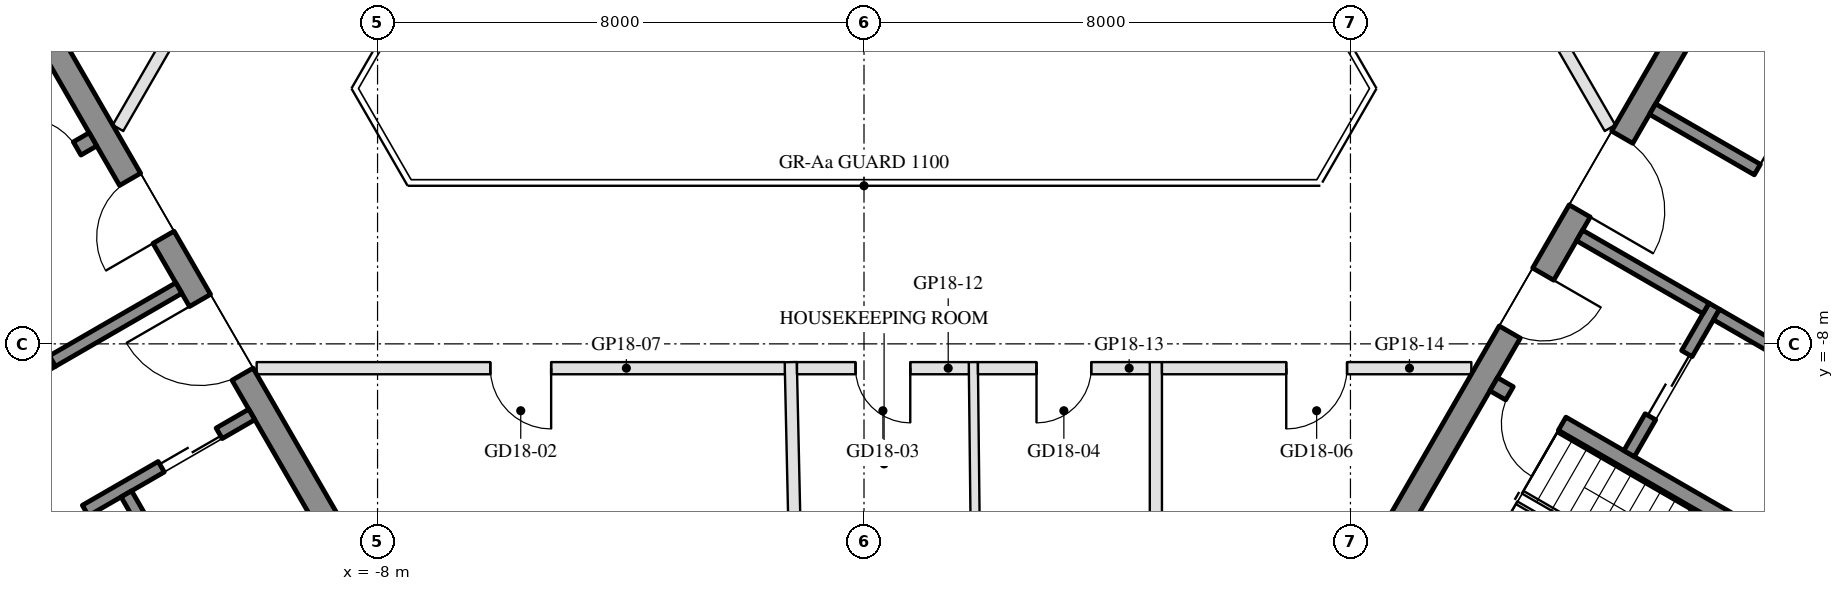
"""IFC4 building model, lengths in metres.
Left out: names, types, materials, properties, quantities, classifications, styles, units other than length and angle.
Written with IfcOpenShell. Run it as: python <this file> out.ifc"""

import sys

from ifc_helpers import new_model, si_unit, direction, frame, frame_2d, origin, place, context, subcontext, project, spatial, rectangle, extrude, element, fill, save


model = new_model("IFC4")
c1 = context("Model", 3, precision=1e-05, world=origin(), true_north=direction((0.0, 1.0)))
c2 = subcontext(c1, "Body", "Model", "MODEL_VIEW")
j1 = project(units=[si_unit("LENGTHUNIT", "METRE"), si_unit("PLANEANGLEUNIT", "RADIAN")], contexts=[c1])
p1 = place(None, origin())
s1 = spatial("IfcSite", under=j1, at=p1, CompositionType="ELEMENT")
p2 = place(p1, origin())
s2 = spatial("IfcBuilding", under=s1, at=p2, CompositionType="ELEMENT")
p3 = place(p2, frame((0.0, 0.0, 194.7)))
s3 = spatial("IfcBuildingStorey", under=s2, at=p3, CompositionType="ELEMENT", Elevation=194.7)
p4 = place(p3, frame((-13.845, -2.22, 0.0), z_axis=(0.0, 0.0, 1.0), x_axis=(0.500004234368, -0.866022959057, 0.0)))
e1 = element("IfcWall", 1, at=p4, inside=s3, PredefinedType="SHEAR", context=c2, shape_type="SweptSolid", body=[
    extrude(rectangle(XDim=10.0, YDim=0.4, at=frame_2d((5.0, 0.0))), origin(), (0.0, 0.0, 1.0), 3.5),
])
p5 = place(p4, frame((3.55, 0.0, 0.0)))
e2 = element("IfcOpeningElement", 2, at=p5, cuts=e1, PredefinedType="OPENING", context=c2, shape_type="SweptSolid", body=[
    extrude(rectangle(XDim=1.1, YDim=2.1, at=frame_2d((0.55, 1.05))), frame((0.0, 0.21, 0.0), z_axis=(0.0, -1.0, 0.0), x_axis=(1.0, 0.0, 0.0)), (0.0, 0.0, 1.0), 0.42),
])
p6 = place(p4, frame((5.85, 0.0, 0.0)))
e3 = element("IfcOpeningElement", 3, at=p6, cuts=e1, PredefinedType="OPENING", context=c2, shape_type="SweptSolid", body=[
    extrude(rectangle(XDim=1.4, YDim=2.1, at=frame_2d((0.7, 1.05))), frame((0.0, 0.21, 0.0), z_axis=(0.0, -1.0, 0.0), x_axis=(1.0, 0.0, 0.0)), (0.0, 0.0, 1.0), 0.42),
])
p7 = place(p3, frame((-12.681, -4.636, 0.0), z_axis=(0.0, 0.0, 1.0), x_axis=(-0.866021702275, -0.500006411147, 0.0)))
e4 = element("IfcWall", 4, at=p7, inside=s3, PredefinedType="SHEAR", context=c2, shape_type="SweptSolid", body=[
    extrude(rectangle(XDim=6.45, YDim=0.25, at=frame_2d((3.225, 0.0))), origin(), (0.0, 0.0, 1.0), 3.5),
])
p8 = place(p7, frame((0.3, 0.0, 0.0)))
e5 = element("IfcOpeningElement", 5, at=p8, cuts=e4, PredefinedType="OPENING", context=c2, shape_type="SweptSolid", body=[
    extrude(rectangle(XDim=1.0, YDim=2.1, at=frame_2d((0.5, 1.05))), frame((0.0, 0.135, 0.0), z_axis=(0.0, -1.0, 0.0), x_axis=(1.0, 0.0, 0.0)), (0.0, 0.0, 1.0), 0.27),
])
p9 = place(p3, frame((-14.783, -5.995, 0.0), z_axis=(0.0, 0.0, 1.0), x_axis=(0.49994636267, -0.866056369097, 0.0)))
e6 = element("IfcWall", 6, at=p9, inside=s3, PredefinedType="SHEAR", context=c2, shape_type="SweptSolid", body=[
    extrude(rectangle(XDim=2.8, YDim=0.2, at=frame_2d((1.4, 0.0))), origin(), (0.0, 0.0, 1.0), 3.5),
])
p10 = place(p9, frame((0.7, 0.0, 0.0)))
e7 = element("IfcOpeningElement", 7, at=p10, cuts=e6, PredefinedType="OPENING", context=c2, shape_type="SweptSolid", body=[
    extrude(rectangle(XDim=1.2, YDim=2.1, at=frame_2d((0.6, 1.05))), frame((0.0, 0.11, 0.0), z_axis=(0.0, -1.0, 0.0), x_axis=(1.0, 0.0, 0.0)), (0.0, 0.0, 1.0), 0.22),
])
p11 = place(p3, frame((-11.268, -7.083, 0.0), z_axis=(0.0, 0.0, 1.0), x_axis=(-0.866050077142, -0.499957262057, 0.0)))
e8 = element("IfcWall", 8, at=p11, inside=s3, PredefinedType="SHEAR", context=c2, shape_type="SweptSolid", body=[
    extrude(rectangle(XDim=2.4, YDim=0.2, at=frame_2d((1.2, 0.0))), origin(), (0.0, 0.0, 1.0), 3.5),
])
p12 = place(p3, frame((-10.068, -9.162, 0.0), z_axis=(0.0, 0.0, 1.0), x_axis=(-0.866032725843, -0.499987317609, 0.0)))
e9 = element("IfcWall", 9, at=p12, inside=s3, PredefinedType="SHEAR", context=c2, shape_type="SweptSolid", body=[
    extrude(rectangle(XDim=10.16, YDim=0.2, at=frame_2d((5.08, 0.0))), origin(), (0.0, 0.0, 1.0), 3.5),
])
p13 = place(p12, frame((0.62, 0.0, 0.0)))
e10 = element("IfcOpeningElement", 10, at=p13, cuts=e9, PredefinedType="OPENING", context=c2, shape_type="SweptSolid", body=[
    extrude(rectangle(XDim=1.1, YDim=2.1, at=frame_2d((0.55, 1.05))), frame((0.0, 0.11, 0.0), z_axis=(0.0, -1.0, 0.0), x_axis=(1.0, 0.0, 0.0)), (0.0, 0.0, 1.0), 0.22),
])
p14 = place(p12, frame((3.16, 0.0, 0.0)))
e11 = element("IfcOpeningElement", 11, at=p14, cuts=e9, PredefinedType="OPENING", context=c2, shape_type="SweptSolid", body=[
    extrude(rectangle(XDim=1.1, YDim=2.1, at=frame_2d((0.55, 1.05))), frame((0.0, 0.11, 0.0), z_axis=(0.0, -1.0, 0.0), x_axis=(1.0, 0.0, 0.0)), (0.0, 0.0, 1.0), 0.22),
])
p15 = place(p12, frame((5.7, 0.0, 0.0)))
e12 = element("IfcOpeningElement", 12, at=p15, cuts=e9, PredefinedType="OPENING", context=c2, shape_type="SweptSolid", body=[
    extrude(rectangle(XDim=1.1, YDim=2.1, at=frame_2d((0.55, 1.05))), frame((0.0, 0.11, 0.0), z_axis=(0.0, -1.0, 0.0), x_axis=(1.0, 0.0, 0.0)), (0.0, 0.0, 1.0), 0.22),
])
p16 = place(p12, frame((8.24, 0.0, 0.0)))
e13 = element("IfcOpeningElement", 13, at=p16, cuts=e9, PredefinedType="OPENING", context=c2, shape_type="SweptSolid", body=[
    extrude(rectangle(XDim=1.1, YDim=2.1, at=frame_2d((0.55, 1.05))), frame((0.0, 0.11, 0.0), z_axis=(0.0, -1.0, 0.0), x_axis=(1.0, 0.0, 0.0)), (0.0, 0.0, 1.0), 0.22),
])
p17 = place(p3, frame((-12.131, -10.468, 0.0), z_axis=(0.0, 0.0, 1.0), x_axis=(0.499972520799, -0.866041268327, 0.0)))
e14 = element("IfcWall", 14, at=p17, inside=s3, PredefinedType="SHEAR", context=c2, shape_type="SweptSolid", body=[
    extrude(rectangle(XDim=2.0, YDim=0.2, at=frame_2d((1.0, 0.0))), origin(), (0.0, 0.0, 1.0), 3.5),
])
p18 = place(p3, frame((13.797, -1.903, 0.0), z_axis=(0.0, 0.0, 1.0), x_axis=(0.866025009528, -0.500000682871, 0.0)))
e15 = element("IfcWall", 15, at=p18, inside=s3, PredefinedType="SHEAR", context=c2, shape_type="SweptSolid", body=[
    extrude(rectangle(XDim=14.837, YDim=0.5, at=frame_2d((7.418, 0.0))), origin(), (0.0, 0.0, 1.0), 3.5),
])
p19 = place(p3, frame((8.845, -10.88, 0.0), z_axis=(0.0, 0.0, 1.0), x_axis=(0.500004234368, 0.866022959057, 0.0)))
e16 = element("IfcWall", 16, at=p19, inside=s3, PredefinedType="SHEAR", context=c2, shape_type="SweptSolid", body=[
    extrude(rectangle(XDim=10.0, YDim=0.4, at=frame_2d((5.0, 0.0))), origin(), (0.0, 0.0, 1.0), 3.5),
])
p20 = place(p19, frame((3.55, 0.0, 0.0)))
e17 = element("IfcOpeningElement", 17, at=p20, cuts=e16, PredefinedType="OPENING", context=c2, shape_type="SweptSolid", body=[
    extrude(rectangle(XDim=1.1, YDim=2.1, at=frame_2d((0.55, 1.05))), frame((0.0, 0.21, 0.0), z_axis=(0.0, -1.0, 0.0), x_axis=(1.0, 0.0, 0.0)), (0.0, 0.0, 1.0), 0.42),
])
p21 = place(p19, frame((5.85, 0.0, 0.0)))
e18 = element("IfcOpeningElement", 18, at=p21, cuts=e16, PredefinedType="OPENING", context=c2, shape_type="SweptSolid", body=[
    extrude(rectangle(XDim=1.4, YDim=2.1, at=frame_2d((0.7, 1.05))), frame((0.0, 0.21, 0.0), z_axis=(0.0, -1.0, 0.0), x_axis=(1.0, 0.0, 0.0)), (0.0, 0.0, 1.0), 0.42),
])
p22 = place(p3, frame((10.356, -8.664, 0.0), z_axis=(0.0, 0.0, 1.0), x_axis=(0.866028629588, -0.499994412703, 0.0)))
e19 = element("IfcWall", 19, at=p22, inside=s3, PredefinedType="SHEAR", context=c2, shape_type="SweptSolid", body=[
    extrude(rectangle(XDim=6.45, YDim=0.25, at=frame_2d((3.225, 0.0))), origin(), (0.0, 0.0, 1.0), 3.5),
])
p23 = place(p22, frame((0.3, 0.0, 0.0)))
e20 = element("IfcOpeningElement", 20, at=p23, cuts=e19, PredefinedType="OPENING", context=c2, shape_type="SweptSolid", body=[
    extrude(rectangle(XDim=1.0, YDim=2.1, at=frame_2d((0.5, 1.05))), frame((0.0, 0.135, 0.0), z_axis=(0.0, -1.0, 0.0), x_axis=(1.0, 0.0, 0.0)), (0.0, 0.0, 1.0), 0.27),
])
p24 = place(p3, frame((12.583, -9.805, 0.0), z_axis=(0.0, 0.0, 1.0), x_axis=(0.49994636267, 0.866056369097, 0.0)))
e21 = element("IfcWall", 21, at=p24, inside=s3, PredefinedType="SHEAR", context=c2, shape_type="SweptSolid", body=[
    extrude(rectangle(XDim=2.8, YDim=0.2, at=frame_2d((1.4, 0.0))), origin(), (0.0, 0.0, 1.0), 3.5),
])
p25 = place(p24, frame((0.7, 0.0, 0.0)))
e22 = element("IfcOpeningElement", 22, at=p25, cuts=e21, PredefinedType="OPENING", context=c2, shape_type="SweptSolid", body=[
    extrude(rectangle(XDim=1.2, YDim=2.1, at=frame_2d((0.6, 1.05))), frame((0.0, 0.11, 0.0), z_axis=(0.0, -1.0, 0.0), x_axis=(1.0, 0.0, 0.0)), (0.0, 0.0, 1.0), 0.22),
])
p26 = place(p3, frame((11.768, -6.217, 0.0), z_axis=(0.0, 0.0, 1.0), x_axis=(0.866050077142, -0.499957262057, 0.0)))
e23 = element("IfcWall", 23, at=p26, inside=s3, PredefinedType="SHEAR", context=c2, shape_type="SweptSolid", body=[
    extrude(rectangle(XDim=2.4, YDim=0.2, at=frame_2d((1.2, 0.0))), origin(), (0.0, 0.0, 1.0), 3.5),
])
p27 = place(p3, frame((14.02, -7.517, 0.0), z_axis=(0.0, 0.0, 1.0), x_axis=(0.866034573852, -0.49998411664, 0.0)))
e24 = element("IfcWall", 24, at=p27, inside=s3, PredefinedType="SHEAR", context=c2, shape_type="SweptSolid", body=[
    extrude(rectangle(XDim=2.8, YDim=0.2, at=frame_2d((1.4, 0.0))), origin(), (0.0, 0.0, 1.0), 3.5),
])
p28 = place(p3, frame((12.968, -4.138, 0.0), z_axis=(0.0, 0.0, 1.0), x_axis=(0.866028328073, -0.49999493495, 0.0)))
e25 = element("IfcWall", 25, at=p28, inside=s3, PredefinedType="SHEAR", context=c2, shape_type="SweptSolid", body=[
    extrude(rectangle(XDim=10.16, YDim=0.2, at=frame_2d((5.08, 0.0))), origin(), (0.0, 0.0, 1.0), 3.5),
])
p29 = place(p28, frame((1.99, 0.0, 0.0)))
e26 = element("IfcOpeningElement", 26, at=p29, cuts=e25, PredefinedType="OPENING", context=c2, shape_type="SweptSolid", body=[
    extrude(rectangle(XDim=0.9, YDim=2.1, at=frame_2d((0.45, 1.05))), frame((0.0, 0.11, 0.0), z_axis=(0.0, -1.0, 0.0), x_axis=(1.0, 0.0, 0.0)), (0.0, 0.0, 1.0), 0.22),
])
p30 = place(p28, frame((7.07, 0.0, 0.0)))
e27 = element("IfcOpeningElement", 27, at=p30, cuts=e25, PredefinedType="OPENING", context=c2, shape_type="SweptSolid", body=[
    extrude(rectangle(XDim=0.9, YDim=2.1, at=frame_2d((0.45, 1.05))), frame((0.0, 0.11, 0.0), z_axis=(0.0, -1.0, 0.0), x_axis=(1.0, 0.0, 0.0)), (0.0, 0.0, 1.0), 0.22),
])
p31 = place(p3, frame((-0.98, -18.38, 0.0), z_axis=(0.0, 0.0, 1.0), x_axis=(-0.022277513004, 0.999751825412, 0.0)))
e28 = element("IfcWall", 28, at=p31, inside=s3, PredefinedType="PARTITIONING", context=c2, shape_type="SweptSolid", body=[
    extrude(rectangle(XDim=10.082, YDim=0.2, at=frame_2d((5.041, 0.0))), origin(), (0.0, 0.0, 1.0), 3.06),
])
p32 = place(p3, frame((4.8, -19.28, 0.0), z_axis=(0.0, 0.0, 1.0), x_axis=(0.0, 1.0, 0.0)))
e29 = element("IfcWall", 29, at=p32, inside=s3, PredefinedType="PARTITIONING", context=c2, shape_type="SweptSolid", body=[
    extrude(rectangle(XDim=10.98, YDim=0.2, at=frame_2d((5.49, 0.0))), origin(), (0.0, 0.0, 1.0), 3.06),
])
p33 = place(p3, frame((-1.302, -8.4, 0.0), z_axis=(0.0, 0.0, 1.0), x_axis=(-1.0, 0.0, 0.0)))
e30 = element("IfcWall", 30, at=p33, inside=s3, PredefinedType="PARTITIONING", context=c2, shape_type="SweptSolid", body=[
    extrude(rectangle(XDim=8.686, YDim=0.2, at=frame_2d((4.343, 0.0))), origin(), (0.0, 0.0, 1.0), 2.95),
])
p34 = place(p33, frame((3.843, 0.0, 0.0)))
e31 = element("IfcOpeningElement", 31, at=p34, cuts=e30, PredefinedType="OPENING", context=c2, shape_type="SweptSolid", body=[
    extrude(rectangle(XDim=1.0, YDim=2.1, at=frame_2d((0.5, 1.05))), frame((0.0, 0.11, 0.0), z_axis=(0.0, -1.0, 0.0), x_axis=(1.0, 0.0, 0.0)), (0.0, 0.0, 1.0), 0.22),
])
p35 = place(p3, frame((1.92, -19.28, 0.0), z_axis=(0.0, 0.0, 1.0), x_axis=(-0.011116847578, 0.999938205941, 0.0)))
e32 = element("IfcWall", 32, at=p35, inside=s3, PredefinedType="PARTITIONING", context=c2, shape_type="SweptSolid", body=[
    extrude(rectangle(XDim=10.981, YDim=0.15, at=frame_2d((5.49, 0.0))), origin(), (0.0, 0.0, 1.0), 3.06),
])
p36 = place(p3, frame((1.724, -8.4, 0.0), z_axis=(0.0, 0.0, 1.0), x_axis=(-1.0, 0.0, 0.0)))
e33 = element("IfcWall", 33, at=p36, inside=s3, PredefinedType="PARTITIONING", context=c2, shape_type="SweptSolid", body=[
    extrude(rectangle(XDim=2.826, YDim=0.2, at=frame_2d((1.413, 0.0))), origin(), (0.0, 0.0, 1.0), 2.95),
])
p37 = place(p36, frame((0.963, 0.0, 0.0)))
e34 = element("IfcOpeningElement", 34, at=p37, cuts=e33, PredefinedType="OPENING", context=c2, shape_type="SweptSolid", body=[
    extrude(rectangle(XDim=0.9, YDim=2.1, at=frame_2d((0.45, 1.05))), frame((0.0, 0.11, 0.0), z_axis=(0.0, -1.0, 0.0), x_axis=(1.0, 0.0, 0.0)), (0.0, 0.0, 1.0), 0.22),
])
p38 = place(p3, frame((4.7, -8.4, 0.0), z_axis=(0.0, 0.0, 1.0), x_axis=(-1.0, 0.0, 0.0)))
e35 = element("IfcWall", 35, at=p38, inside=s3, PredefinedType="PARTITIONING", context=c2, shape_type="SweptSolid", body=[
    extrude(rectangle(XDim=2.826, YDim=0.2, at=frame_2d((1.413, 0.0))), origin(), (0.0, 0.0, 1.0), 2.95),
])
p39 = place(p38, frame((0.963, 0.0, 0.0)))
e36 = element("IfcOpeningElement", 36, at=p39, cuts=e35, PredefinedType="OPENING", context=c2, shape_type="SweptSolid", body=[
    extrude(rectangle(XDim=0.9, YDim=2.1, at=frame_2d((0.45, 1.05))), frame((0.0, 0.11, 0.0), z_axis=(0.0, -1.0, 0.0), x_axis=(1.0, 0.0, 0.0)), (0.0, 0.0, 1.0), 0.22),
])
p40 = place(p3, frame((9.988, -8.4, 0.0), z_axis=(0.0, 0.0, 1.0), x_axis=(-1.0, 0.0, 0.0)))
e37 = element("IfcWall", 37, at=p40, inside=s3, PredefinedType="PARTITIONING", context=c2, shape_type="SweptSolid", body=[
    extrude(rectangle(XDim=5.088, YDim=0.2, at=frame_2d((2.544, 0.0))), origin(), (0.0, 0.0, 1.0), 2.95),
])
p41 = place(p40, frame((2.044, 0.0, 0.0)))
e38 = element("IfcOpeningElement", 38, at=p41, cuts=e37, PredefinedType="OPENING", context=c2, shape_type="SweptSolid", body=[
    extrude(rectangle(XDim=1.0, YDim=2.1, at=frame_2d((0.5, 1.05))), frame((0.0, 0.11, 0.0), z_axis=(0.0, -1.0, 0.0), x_axis=(1.0, 0.0, 0.0)), (0.0, 0.0, 1.0), 0.22),
])
p42 = place(p3, frame((9.325, 0.649, 0.0), z_axis=(0.0, 0.0, 1.0), x_axis=(0.500032331163, -0.866006736574, 0.0)))
e39 = element("IfcWall", 39, at=p42, inside=s3, PredefinedType="PARTITIONING", context=c2, shape_type="SweptSolid", body=[
    extrude(rectangle(XDim=5.888, YDim=0.2, at=frame_2d((2.944, 0.0))), origin(), (0.0, 0.0, 1.0), 2.95),
])
p43 = place(p42, frame((2.444, 0.0, 0.0)))
e40 = element("IfcOpeningElement", 40, at=p43, cuts=e39, PredefinedType="OPENING", context=c2, shape_type="SweptSolid", body=[
    extrude(rectangle(XDim=1.0, YDim=2.1, at=frame_2d((0.5, 1.05))), frame((0.0, 0.11, 0.0), z_axis=(0.0, -1.0, 0.0), x_axis=(1.0, 0.0, 0.0)), (0.0, 0.0, 1.0), 0.22),
])
p44 = place(p3, frame((-12.269, -4.45, 0.0), z_axis=(0.0, 0.0, 1.0), x_axis=(0.500026884667, 0.866009881359, 0.0)))
e41 = element("IfcWall", 41, at=p44, inside=s3, PredefinedType="PARTITIONING", context=c2, shape_type="SweptSolid", body=[
    extrude(rectangle(XDim=5.484, YDim=0.2, at=frame_2d((2.742, 0.0))), origin(), (0.0, 0.0, 1.0), 2.95),
])
p45 = place(p44, frame((2.242, 0.0, 0.0)))
e42 = element("IfcOpeningElement", 42, at=p45, cuts=e41, PredefinedType="OPENING", context=c2, shape_type="SweptSolid", body=[
    extrude(rectangle(XDim=1.0, YDim=2.1, at=frame_2d((0.5, 1.05))), frame((0.0, 0.11, 0.0), z_axis=(0.0, -1.0, 0.0), x_axis=(1.0, 0.0, 0.0)), (0.0, 0.0, 1.0), 0.22),
])
p46 = place(p13, origin())
e43 = element("IfcDoor", 43, at=p46, inside=s3, OperationType="DOUBLE_DOOR_SLIDING", PredefinedType="DOOR", context=c2, shape_type="SweptSolid", body=[
    extrude(rectangle(XDim=1.1, YDim=2.1, at=frame_2d((0.55, 1.05))), frame((0.0, 0.025, 0.0), z_axis=(0.0, -1.0, 0.0), x_axis=(1.0, 0.0, 0.0)), (0.0, 0.0, 1.0), 0.05),
])
fill(e10, e43)
p47 = place(p14, origin())
e44 = element("IfcDoor", 44, at=p47, inside=s3, OperationType="DOUBLE_DOOR_SLIDING", PredefinedType="DOOR", context=c2, shape_type="SweptSolid", body=[
    extrude(rectangle(XDim=1.1, YDim=2.1, at=frame_2d((0.55, 1.05))), frame((0.0, 0.025, 0.0), z_axis=(0.0, -1.0, 0.0), x_axis=(1.0, 0.0, 0.0)), (0.0, 0.0, 1.0), 0.05),
])
fill(e11, e44)
p48 = place(p5, frame((1.1, 0.0, 0.0), z_axis=(0.0, 0.0, 1.0), x_axis=(-1.0, 0.0, 0.0)))
e45 = element("IfcDoor", 45, at=p48, inside=s3, OperationType="SINGLE_SWING_LEFT", PredefinedType="DOOR", context=c2, shape_type="SweptSolid", body=[
    extrude(rectangle(XDim=1.1, YDim=2.1, at=frame_2d((0.55, 1.05))), frame((0.0, 0.025, 0.0), z_axis=(0.0, -1.0, 0.0), x_axis=(1.0, 0.0, 0.0)), (0.0, 0.0, 1.0), 0.05),
])
fill(e2, e45)
p49 = place(p6, frame((1.4, 0.0, 0.0), z_axis=(0.0, 0.0, 1.0), x_axis=(-1.0, 0.0, 0.0)))
e46 = element("IfcDoor", 46, at=p49, inside=s3, OperationType="DOUBLE_DOOR_SINGLE_SWING", PredefinedType="DOOR", context=c2, shape_type="SweptSolid", body=[
    extrude(rectangle(XDim=1.4, YDim=2.1, at=frame_2d((0.7, 1.05))), frame((0.0, 0.025, 0.0), z_axis=(0.0, -1.0, 0.0), x_axis=(1.0, 0.0, 0.0)), (0.0, 0.0, 1.0), 0.05),
])
fill(e3, e46)
p50 = place(p8, frame((1.0, 0.0, 0.0), z_axis=(0.0, 0.0, 1.0), x_axis=(-1.0, 0.0, 0.0)))
e47 = element("IfcDoor", 47, at=p50, inside=s3, OperationType="SINGLE_SWING_LEFT", PredefinedType="DOOR", context=c2, shape_type="SweptSolid", body=[
    extrude(rectangle(XDim=1.0, YDim=2.1, at=frame_2d((0.5, 1.05))), frame((0.0, 0.025, 0.0), z_axis=(0.0, -1.0, 0.0), x_axis=(1.0, 0.0, 0.0)), (0.0, 0.0, 1.0), 0.05),
])
fill(e5, e47)
p51 = place(p25, origin())
e48 = element("IfcDoor", 48, at=p51, inside=s3, OperationType="DOUBLE_DOOR_SLIDING", PredefinedType="DOOR", context=c2, shape_type="SweptSolid", body=[
    extrude(rectangle(XDim=1.2, YDim=2.1, at=frame_2d((0.6, 1.05))), frame((0.0, 0.025, 0.0), z_axis=(0.0, -1.0, 0.0), x_axis=(1.0, 0.0, 0.0)), (0.0, 0.0, 1.0), 0.05),
])
fill(e22, e48)
p52 = place(p29, origin())
e49 = element("IfcDoor", 49, at=p52, inside=s3, OperationType="SINGLE_SWING_LEFT", PredefinedType="DOOR", context=c2, shape_type="SweptSolid", body=[
    extrude(rectangle(XDim=0.9, YDim=2.1, at=frame_2d((0.45, 1.05))), frame((0.0, 0.025, 0.0), z_axis=(0.0, -1.0, 0.0), x_axis=(1.0, 0.0, 0.0)), (0.0, 0.0, 1.0), 0.05),
])
fill(e26, e49)
p53 = place(p20, frame((1.1, 0.0, 0.0), z_axis=(0.0, 0.0, 1.0), x_axis=(-1.0, 0.0, 0.0)))
e50 = element("IfcDoor", 50, at=p53, inside=s3, OperationType="SINGLE_SWING_LEFT", PredefinedType="DOOR", context=c2, shape_type="SweptSolid", body=[
    extrude(rectangle(XDim=1.1, YDim=2.1, at=frame_2d((0.55, 1.05))), frame((0.0, 0.025, 0.0), z_axis=(0.0, -1.0, 0.0), x_axis=(1.0, 0.0, 0.0)), (0.0, 0.0, 1.0), 0.05),
])
fill(e17, e50)
p54 = place(p21, frame((1.4, 0.0, 0.0), z_axis=(0.0, 0.0, 1.0), x_axis=(-1.0, 0.0, 0.0)))
e51 = element("IfcDoor", 51, at=p54, inside=s3, OperationType="DOUBLE_DOOR_SINGLE_SWING", PredefinedType="DOOR", context=c2, shape_type="SweptSolid", body=[
    extrude(rectangle(XDim=1.4, YDim=2.1, at=frame_2d((0.7, 1.05))), frame((0.0, 0.025, 0.0), z_axis=(0.0, -1.0, 0.0), x_axis=(1.0, 0.0, 0.0)), (0.0, 0.0, 1.0), 0.05),
])
fill(e18, e51)
p55 = place(p23, frame((1.0, 0.0, 0.0), z_axis=(0.0, 0.0, 1.0), x_axis=(-1.0, 0.0, 0.0)))
e52 = element("IfcDoor", 52, at=p55, inside=s3, OperationType="SINGLE_SWING_LEFT", PredefinedType="DOOR", context=c2, shape_type="SweptSolid", body=[
    extrude(rectangle(XDim=1.0, YDim=2.1, at=frame_2d((0.5, 1.05))), frame((0.0, 0.025, 0.0), z_axis=(0.0, -1.0, 0.0), x_axis=(1.0, 0.0, 0.0)), (0.0, 0.0, 1.0), 0.05),
])
fill(e20, e52)
p56 = place(p34, origin())
e53 = element("IfcDoor", 53, at=p56, inside=s3, OperationType="SINGLE_SWING_LEFT", PredefinedType="DOOR", context=c2, shape_type="SweptSolid", body=[
    extrude(rectangle(XDim=1.0, YDim=2.1, at=frame_2d((0.5, 1.05))), frame((0.0, 0.025, 0.0), z_axis=(0.0, -1.0, 0.0), x_axis=(1.0, 0.0, 0.0)), (0.0, 0.0, 1.0), 0.05),
])
fill(e31, e53)
p57 = place(p37, origin())
e54 = element("IfcDoor", 54, at=p57, inside=s3, OperationType="SINGLE_SWING_LEFT", PredefinedType="DOOR", context=c2, shape_type="SweptSolid", body=[
    extrude(rectangle(XDim=0.9, YDim=2.1, at=frame_2d((0.45, 1.05))), frame((0.0, 0.025, 0.0), z_axis=(0.0, -1.0, 0.0), x_axis=(1.0, 0.0, 0.0)), (0.0, 0.0, 1.0), 0.05),
])
fill(e34, e54)
p58 = place(p39, origin())
e55 = element("IfcDoor", 55, at=p58, inside=s3, OperationType="SINGLE_SWING_RIGHT", PredefinedType="DOOR", context=c2, shape_type="SweptSolid", body=[
    extrude(rectangle(XDim=0.9, YDim=2.1, at=frame_2d((0.45, 1.05))), frame((0.0, 0.025, 0.0), z_axis=(0.0, -1.0, 0.0), x_axis=(1.0, 0.0, 0.0)), (0.0, 0.0, 1.0), 0.05),
])
fill(e36, e55)
p59 = place(p41, origin())
e56 = element("IfcDoor", 56, at=p59, inside=s3, OperationType="SINGLE_SWING_RIGHT", PredefinedType="DOOR", context=c2, shape_type="SweptSolid", body=[
    extrude(rectangle(XDim=1.0, YDim=2.1, at=frame_2d((0.5, 1.05))), frame((0.0, 0.025, 0.0), z_axis=(0.0, -1.0, 0.0), x_axis=(1.0, 0.0, 0.0)), (0.0, 0.0, 1.0), 0.05),
])
fill(e38, e56)
save(model, sys.argv[1])
